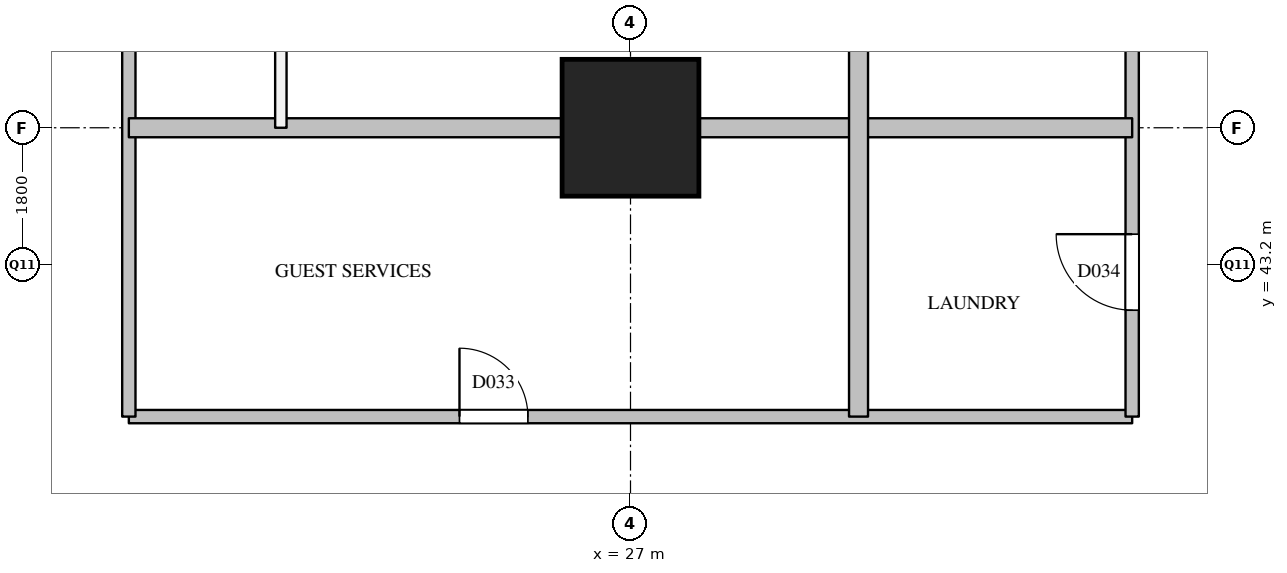
"""IFC4 building model, lengths in metres.
Left out: names, types, materials, properties, quantities, classifications, styles, units other than length and angle.
Written with IfcOpenShell. Run it as: python <this file> out.ifc"""

import sys

from ifc_helpers import new_model, si_unit, direction, frame, frame_2d, origin, origin_2d, place, context, subcontext, project, spatial, rectangle, extrude, element, fill, save


model = new_model("IFC4")
c1 = context("Model", 3, precision=1e-05, world=origin(), true_north=direction((0.0, 1.0)))
c2 = subcontext(c1, "Body", "Model", "MODEL_VIEW")
j1 = project(units=[si_unit("LENGTHUNIT", "METRE"), si_unit("PLANEANGLEUNIT", "RADIAN")], contexts=[c1])
p1 = place(None, origin())
s1 = spatial("IfcSite", under=j1, at=p1, CompositionType="ELEMENT")
p2 = place(p1, origin())
s2 = spatial("IfcBuilding", under=s1, at=p2, CompositionType="ELEMENT")
p3 = place(p2, frame((0.0, 0.0, 50.0)))
s3 = spatial("IfcBuildingStorey", under=s2, at=p3, CompositionType="ELEMENT", Elevation=50.0)
p4 = place(p3, frame((27.0, 45.0, 0.0), z_axis=(0.0, 0.0, 1.0), x_axis=(1.0, 0.0, 0.0)))
e1 = element("IfcColumn", 1, at=p4, inside=s3, PredefinedType="COLUMN", context=c2, shape_type="SweptSolid", body=[
    extrude(rectangle(XDim=1.8, YDim=1.8, at=origin_2d()), origin(), (0.0, 0.0, 1.0), 3.8),
])
p5 = place(p3, frame((20.4, 41.2, 0.0), z_axis=(0.0, 0.0, 1.0), x_axis=(1.0, 0.0, 0.0)))
e2 = element("IfcWall", 2, at=p5, inside=s3, PredefinedType="PARTITIONING", context=c2, shape_type="SweptSolid", body=[
    extrude(rectangle(XDim=13.2, YDim=0.175, at=frame_2d((6.6, 0.0))), origin(), (0.0, 0.0, 1.0), 2.5),
])
p6 = place(p5, frame((4.35, 0.0, 0.0)))
e3 = element("IfcOpeningElement", 3, at=p6, cuts=e2, PredefinedType="OPENING", context=c2, shape_type="SweptSolid", body=[
    extrude(rectangle(XDim=0.9, YDim=2.1, at=frame_2d((0.45, 1.05))), frame((0.0, 0.097, 0.0), z_axis=(0.0, -1.0, 0.0), x_axis=(1.0, 0.0, 0.0)), (0.0, 0.0, 1.0), 0.195),
])
p7 = place(p3, frame((20.4, 41.2, 0.0), z_axis=(0.0, 0.0, 1.0), x_axis=(0.0, 1.0, 0.0)))
e4 = element("IfcWall", 4, at=p7, inside=s3, PredefinedType="PARTITIONING", context=c2, shape_type="SweptSolid", body=[
    extrude(rectangle(XDim=11.2, YDim=0.175, at=frame_2d((5.6, 0.0))), origin(), (0.0, 0.0, 1.0), 3.5),
])
p8 = place(p7, frame((6.6, 0.0, 0.0)))
e5 = element("IfcOpeningElement", 5, at=p8, cuts=e4, PredefinedType="OPENING", context=c2, shape_type="SweptSolid", body=[
    extrude(rectangle(XDim=1.0, YDim=2.1, at=frame_2d((0.5, 1.05))), frame((0.0, 0.097, 0.0), z_axis=(0.0, -1.0, 0.0), x_axis=(1.0, 0.0, 0.0)), (0.0, 0.0, 1.0), 0.195),
])
p9 = place(p3, frame((33.6, 41.2, 0.0), z_axis=(0.0, 0.0, 1.0), x_axis=(0.0, 1.0, 0.0)))
e6 = element("IfcWall", 6, at=p9, inside=s3, PredefinedType="PARTITIONING", context=c2, shape_type="SweptSolid", body=[
    extrude(rectangle(XDim=11.2, YDim=0.175, at=frame_2d((5.6, 0.0))), origin(), (0.0, 0.0, 1.0), 3.5),
])
p10 = place(p9, frame((1.4, 0.0, 0.0)))
e7 = element("IfcOpeningElement", 7, at=p10, cuts=e6, PredefinedType="OPENING", context=c2, shape_type="SweptSolid", body=[
    extrude(rectangle(XDim=1.0, YDim=2.1, at=frame_2d((0.5, 1.05))), frame((0.0, 0.097, 0.0), z_axis=(0.0, -1.0, 0.0), x_axis=(1.0, 0.0, 0.0)), (0.0, 0.0, 1.0), 0.195),
])
p11 = place(p9, frame((7.05, 0.0, 0.0)))
e8 = element("IfcOpeningElement", 8, at=p11, cuts=e6, PredefinedType="OPENING", context=c2, shape_type="SweptSolid", body=[
    extrude(rectangle(XDim=0.9, YDim=2.1, at=frame_2d((0.45, 1.05))), frame((0.0, 0.097, 0.0), z_axis=(0.0, -1.0, 0.0), x_axis=(1.0, 0.0, 0.0)), (0.0, 0.0, 1.0), 0.195),
])
p12 = place(p3, frame((22.4, 45.0, 0.0), z_axis=(0.0, 0.0, 1.0), x_axis=(0.0, 1.0, 0.0)))
e9 = element("IfcWall", 9, at=p12, inside=s3, PredefinedType="PARTITIONING", context=c2, shape_type="SweptSolid", body=[
    extrude(rectangle(XDim=6.6, YDim=0.15, at=frame_2d((3.3, 0.0))), origin(), (0.0, 0.0, 1.0), 3.5),
])
p13 = place(p12, frame((2.85, 0.0, 0.0)))
e10 = element("IfcOpeningElement", 10, at=p13, cuts=e9, PredefinedType="OPENING", context=c2, shape_type="SweptSolid", body=[
    extrude(rectangle(XDim=0.9, YDim=2.1, at=frame_2d((0.45, 1.05))), frame((0.0, 0.085, 0.0), z_axis=(0.0, -1.0, 0.0), x_axis=(1.0, 0.0, 0.0)), (0.0, 0.0, 1.0), 0.17),
])
p14 = place(p3, frame((20.4, 45.0, 0.0), z_axis=(0.0, 0.0, 1.0), x_axis=(1.0, 0.0, 0.0)))
e11 = element("IfcWall", 11, at=p14, inside=s3, PredefinedType="PARTITIONING", context=c2, shape_type="SweptSolid", body=[
    extrude(rectangle(XDim=13.2, YDim=0.25, at=frame_2d((6.6, 0.0))), origin(), (0.0, 0.0, 1.0), 3.5),
])
p15 = place(p3, frame((30.0, 41.2, 0.0), z_axis=(0.0, 0.0, 1.0), x_axis=(0.0, 1.0, 0.0)))
e12 = element("IfcWall", 12, at=p15, inside=s3, PredefinedType="PARTITIONING", context=c2, shape_type="SweptSolid", body=[
    extrude(rectangle(XDim=12.8, YDim=0.25, at=frame_2d((6.4, 0.0))), origin(), (0.0, 0.0, 1.0), 2.5),
])
p16 = place(p6, origin())
e13 = element("IfcDoor", 13, at=p16, inside=s3, OperationType="SINGLE_SWING_LEFT", PredefinedType="DOOR", context=c2, shape_type="SweptSolid", body=[
    extrude(rectangle(XDim=0.9, YDim=2.1, at=frame_2d((0.45, 1.05))), frame((0.0, 0.025, 0.0), z_axis=(0.0, -1.0, 0.0), x_axis=(1.0, 0.0, 0.0)), (0.0, 0.0, 1.0), 0.05),
])
fill(e3, e13)
p17 = place(p10, origin())
e14 = element("IfcDoor", 14, at=p17, inside=s3, OperationType="SINGLE_SWING_RIGHT", PredefinedType="DOOR", context=c2, shape_type="SweptSolid", body=[
    extrude(rectangle(XDim=1.0, YDim=2.1, at=frame_2d((0.5, 1.05))), frame((0.0, 0.025, 0.0), z_axis=(0.0, -1.0, 0.0), x_axis=(1.0, 0.0, 0.0)), (0.0, 0.0, 1.0), 0.05),
])
fill(e7, e14)
save(model, sys.argv[1])
